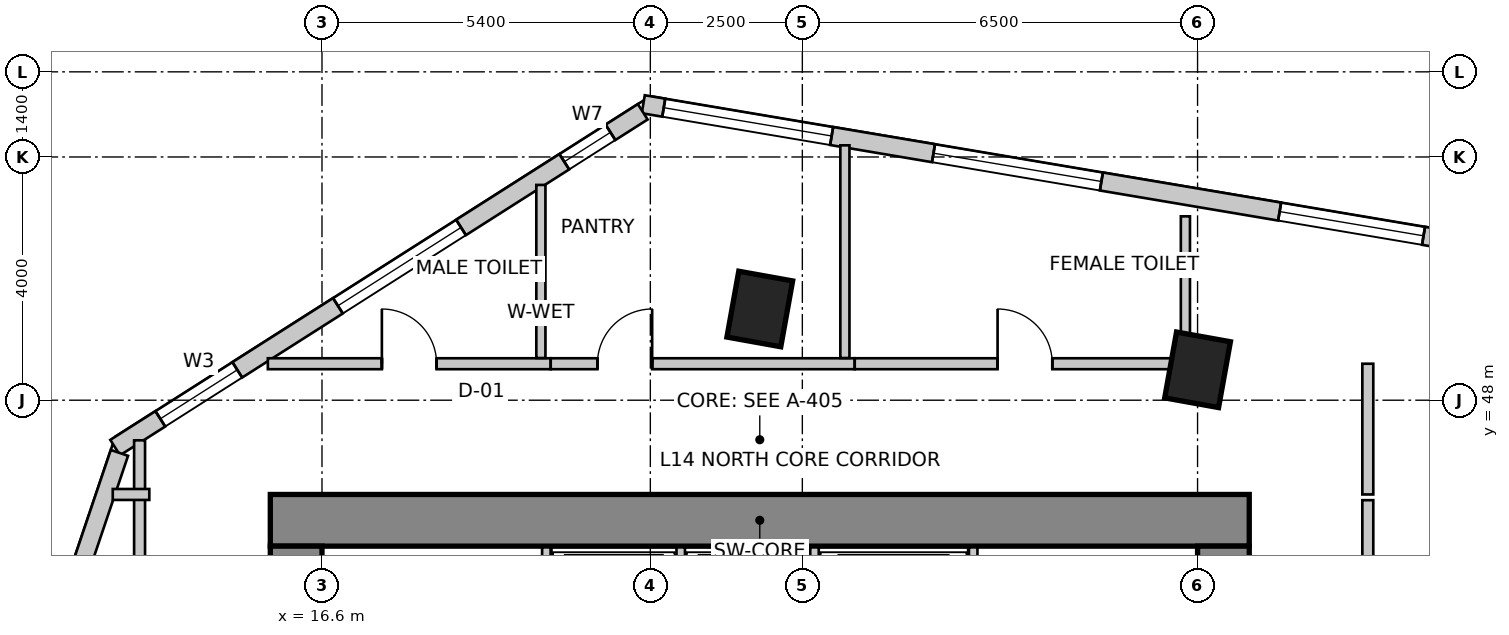
"""IFC4 building model, lengths in metres.
Left out: names, types, materials, properties, quantities, classifications, styles, units other than length and angle.
Written with IfcOpenShell. Run it as: python <this file> out.ifc"""

import sys

from ifc_helpers import new_model, si_unit, direction, frame, frame_2d, origin, origin_2d, place, context, subcontext, project, spatial, rectangle, extrude, source, transform, mapped, element, fill, save


model = new_model("IFC4")
c1 = context("Model", 3, precision=1e-05, world=origin(), true_north=direction((0.0, 1.0)))
c2 = subcontext(c1, "Body", "Model", "MODEL_VIEW")
j1 = project(units=[si_unit("LENGTHUNIT", "METRE"), si_unit("PLANEANGLEUNIT", "RADIAN")], contexts=[c1])
p1 = place(None, origin())
s1 = spatial("IfcSite", under=j1, at=p1, CompositionType="ELEMENT")
p2 = place(p1, origin())
s2 = spatial("IfcBuilding", under=s1, at=p2, CompositionType="ELEMENT")
p3 = place(p2, frame((0.0, 0.0, 59.0)))
s3 = spatial("IfcBuildingStorey", under=s2, at=p3, CompositionType="ELEMENT", Elevation=59.0)
p4 = place(p3, frame((15.75, 46.025, 0.0), z_axis=(0.0, 0.0, 1.0), x_axis=(1.0, 0.0, 0.0)))
e1 = element("IfcWall", 1, at=p4, inside=s3, PredefinedType="SHEAR", context=c2, shape_type="SweptSolid", body=[
    extrude(rectangle(XDim=16.1, YDim=0.85, at=frame_2d((8.05, 0.0))), origin(), (0.0, 0.0, 1.0), 4.0),
])
p5 = place(p3, frame((16.175, 34.2, 0.0), z_axis=(0.0, 0.0, 1.0), x_axis=(0.0, 1.0, 0.0)))
e2 = element("IfcWall", 2, at=p5, inside=s3, PredefinedType="SHEAR", context=c2, shape_type="SweptSolid", body=[
    extrude(rectangle(XDim=11.4, YDim=0.85, at=frame_2d((5.7, 0.0))), origin(), (0.0, 0.0, 1.0), 4.0),
])
m1 = source(origin(), c2, "Body", "SweptSolid", [
    extrude(rectangle(XDim=1.1, YDim=2.15, at=frame_2d((0.55, 1.075))), frame((0.0, 0.435, 0.0), z_axis=(0.0, -1.0, 0.0), x_axis=(1.0, 0.0, 0.0)), (0.0, 0.0, 1.0), 0.87),
])
p6 = place(p5, frame((7.15, 0.0, 0.0)))
e3 = element("IfcOpeningElement", 3, at=p6, cuts=e2, PredefinedType="OPENING", context=c2, shape_type="MappedRepresentation", body=[
    mapped(m1, transform((0.0, 0.0, 0.0), scale=1.0)),
])
p7 = place(p3, frame((31.425, 34.2, 0.0), z_axis=(0.0, 0.0, 1.0), x_axis=(0.0, 1.0, 0.0)))
e4 = element("IfcWall", 4, at=p7, inside=s3, PredefinedType="SHEAR", context=c2, shape_type="SweptSolid", body=[
    extrude(rectangle(XDim=11.4, YDim=0.85, at=frame_2d((5.7, 0.0))), origin(), (0.0, 0.0, 1.0), 4.0),
])
p8 = place(p7, frame((7.35, 0.0, 0.0)))
e5 = element("IfcOpeningElement", 5, at=p8, cuts=e4, PredefinedType="OPENING", context=c2, shape_type="MappedRepresentation", body=[
    mapped(m1, transform((0.0, 0.0, 0.0), scale=1.0)),
])
m2 = source(origin(), c2, "Body", "SweptSolid", [
    extrude(rectangle(XDim=0.9, YDim=1.1, at=origin_2d()), origin(), (0.0, 0.0, 1.0), 4.0),
])
for number, where, z_axis, x_axis in (
    (6, (23.8, 49.5, 0.0), (0.0, 0.0, 1.0), (0.984, -0.177, 0.0)),
    (7, (31.0, 48.5, 0.0), (0.0, 0.0, 1.0), (0.984, -0.177, 0.0)),
):
    element("IfcColumn", number, at=place(p3, frame(where, z_axis=z_axis, x_axis=x_axis)), inside=s3, PredefinedType="COLUMN", context=c2, shape_type="MappedRepresentation", body=[
        mapped(m2, transform((0.0, 0.0, 0.0), scale=1.0)),
    ])
p9 = place(p3, frame((58.761, 46.648, 0.0), z_axis=(0.0, 0.0, 1.0), x_axis=(-0.98607502735, 0.166301053624, 0.0)))
e8 = element("IfcWall", 8, at=p9, inside=s3, PredefinedType="SOLIDWALL", context=c2, shape_type="SweptSolid", body=[
    extrude(rectangle(XDim=37.397, YDim=0.3, at=frame_2d((18.699, 0.0))), origin(), (0.0, 0.0, 1.0), 3.7),
])
m3 = source(origin(), c2, "Body", "SweptSolid", [
    extrude(rectangle(XDim=2.4, YDim=2.2, at=frame_2d((1.2, 1.1))), frame((0.0, 0.16, 0.0), z_axis=(0.0, -1.0, 0.0), x_axis=(1.0, 0.0, 0.0)), (0.0, 0.0, 1.0), 0.32),
])
p10 = place(p9, frame((0.375, 0.0, 0.85)))
e9 = element("IfcOpeningElement", 9, at=p10, cuts=e8, PredefinedType="OPENING", context=c2, shape_type="MappedRepresentation", body=[
    mapped(m3, transform((0.0, 0.0, 0.0), scale=1.0)),
])
m4 = source(origin(), c2, "Body", "SweptSolid", [
    extrude(rectangle(XDim=2.8, YDim=2.4, at=frame_2d((1.4, 1.2))), frame((0.0, 0.16, 0.0), z_axis=(0.0, -1.0, 0.0), x_axis=(1.0, 0.0, 0.0)), (0.0, 0.0, 1.0), 0.32),
])
p11 = place(p9, frame((5.357, 0.0, 0.85)))
e10 = element("IfcOpeningElement", 10, at=p11, cuts=e8, PredefinedType="OPENING", context=c2, shape_type="MappedRepresentation", body=[
    mapped(m4, transform((0.0, 0.0, 0.0), scale=1.0)),
])
p12 = place(p9, frame((12.772, 0.0, 0.85)))
e11 = element("IfcOpeningElement", 11, at=p12, cuts=e8, PredefinedType="OPENING", context=c2, shape_type="MappedRepresentation", body=[
    mapped(m4, transform((0.0, 0.0, 0.0), scale=1.0)),
])
p13 = place(p9, frame((19.194, 0.0, 0.85)))
e12 = element("IfcOpeningElement", 12, at=p13, cuts=e8, PredefinedType="OPENING", context=c2, shape_type="MappedRepresentation", body=[
    mapped(m4, transform((0.0, 0.0, 0.0), scale=1.0)),
])
p14 = place(p9, frame((24.384, 0.0, 0.85)))
e13 = element("IfcOpeningElement", 13, at=p14, cuts=e8, PredefinedType="OPENING", context=c2, shape_type="MappedRepresentation", body=[
    mapped(m3, transform((0.0, 0.0, 0.0), scale=1.0)),
])
p15 = place(p9, frame((29.757, 0.0, 0.85)))
e14 = element("IfcOpeningElement", 14, at=p15, cuts=e8, PredefinedType="OPENING", context=c2, shape_type="MappedRepresentation", body=[
    mapped(m4, transform((0.0, 0.0, 0.0), scale=1.0)),
])
p16 = place(p9, frame((34.256, 0.0, 0.85)))
e15 = element("IfcOpeningElement", 15, at=p16, cuts=e8, PredefinedType="OPENING", context=c2, shape_type="MappedRepresentation", body=[
    mapped(m4, transform((0.0, 0.0, 0.0), scale=1.0)),
])
p17 = place(p3, frame((21.875, 52.743, 0.0), z_axis=(0.0, 0.0, 1.0), x_axis=(-0.843647802826, -0.536896996441, 0.0)))
e16 = element("IfcWall", 16, at=p17, inside=s3, PredefinedType="SOLIDWALL", context=c2, shape_type="SweptSolid", body=[
    extrude(rectangle(XDim=10.284, YDim=0.3, at=frame_2d((5.142, 0.0))), origin(), (0.0, 0.0, 1.0), 3.7),
])
m5 = source(origin(), c2, "Body", "SweptSolid", [
    extrude(rectangle(XDim=0.9, YDim=1.6, at=frame_2d((0.45, 0.8))), frame((0.0, 0.16, 0.0), z_axis=(0.0, -1.0, 0.0), x_axis=(1.0, 0.0, 0.0)), (0.0, 0.0, 1.0), 0.32),
])
p18 = place(p17, frame((0.629, 0.0, 0.85)))
e17 = element("IfcOpeningElement", 17, at=p18, cuts=e16, PredefinedType="OPENING", context=c2, shape_type="MappedRepresentation", body=[
    mapped(m5, transform((0.0, 0.0, 0.0), scale=1.0)),
])
p19 = place(p17, frame((3.542, 0.0, 0.85)))
e18 = element("IfcOpeningElement", 18, at=p19, cuts=e16, PredefinedType="OPENING", context=c2, shape_type="MappedRepresentation", body=[
    mapped(m3, transform((0.0, 0.0, 0.0), scale=1.0)),
])
m6 = source(origin(), c2, "Body", "SweptSolid", [
    extrude(rectangle(XDim=1.5, YDim=1.8, at=frame_2d((0.75, 0.9))), frame((0.0, 0.16, 0.0), z_axis=(0.0, -1.0, 0.0), x_axis=(1.0, 0.0, 0.0)), (0.0, 0.0, 1.0), 0.32),
])
p20 = place(p17, frame((7.904, 0.0, 0.85)))
e19 = element("IfcOpeningElement", 19, at=p20, cuts=e16, PredefinedType="OPENING", context=c2, shape_type="MappedRepresentation", body=[
    mapped(m6, transform((0.0, 0.0, 0.0), scale=1.0)),
])
p21 = place(p3, frame((13.269, 47.134, 0.0), z_axis=(0.0, 0.0, 1.0), x_axis=(-0.319920423265, -0.947444416722, 0.0)))
e20 = element("IfcWall", 20, at=p21, inside=s3, PredefinedType="SOLIDWALL", context=c2, shape_type="SweptSolid", body=[
    extrude(rectangle(XDim=16.135, YDim=0.3, at=frame_2d((8.067, 0.0))), origin(), (0.0, 0.0, 1.0), 3.7),
])
p22 = place(p21, frame((1.988, 0.0, 0.85)))
e21 = element("IfcOpeningElement", 21, at=p22, cuts=e20, PredefinedType="OPENING", context=c2, shape_type="MappedRepresentation", body=[
    mapped(m4, transform((0.0, 0.0, 0.0), scale=1.0)),
])
p23 = place(p21, frame((7.159, 0.0, 0.85)))
e22 = element("IfcOpeningElement", 22, at=p23, cuts=e20, PredefinedType="OPENING", context=c2, shape_type="MappedRepresentation", body=[
    mapped(m3, transform((0.0, 0.0, 0.0), scale=1.0)),
])
p24 = place(p21, frame((11.93, 0.0, 0.85)))
e23 = element("IfcOpeningElement", 23, at=p24, cuts=e20, PredefinedType="OPENING", context=c2, shape_type="MappedRepresentation", body=[
    mapped(m4, transform((0.0, 0.0, 0.0), scale=1.0)),
])
for number, where, z_axis, x_axis in (
    (24, (20.29, 43.28, 0.0), (0.0, 0.0, 1.0), (0.0, 1.0, 0.0)),
    (25, (27.31, 43.28, 0.0), (0.0, 0.0, 1.0), (0.0, 1.0, 0.0)),
):
    element("IfcWall", number, at=place(p3, frame(where, z_axis=z_axis, x_axis=x_axis)), inside=s3, PredefinedType="SOLIDWALL", context=c2, shape_type="SweptSolid", body=[
        extrude(rectangle(XDim=2.3, YDim=0.14, at=frame_2d((1.15, 0.0))), origin(), (0.0, 0.0, 1.0), 3.7),
    ])
for number, where, z_axis, x_axis in (
    (26, (22.5, 43.02, 0.0), (0.0, 0.0, 1.0), (0.0, 1.0, 0.0)),
    (27, (24.7, 43.02, 0.0), (0.0, 0.0, 1.0), (0.0, 1.0, 0.0)),
):
    element("IfcWall", number, at=place(p3, frame(where, z_axis=z_axis, x_axis=x_axis)), inside=s3, PredefinedType="SOLIDWALL", context=c2, shape_type="SweptSolid", body=[
        extrude(rectangle(XDim=2.56, YDim=0.14, at=frame_2d((1.28, 0.0))), origin(), (0.0, 0.0, 1.0), 3.7),
    ])
p25 = place(p3, frame((13.6, 33.444, 0.0), z_axis=(0.0, 0.0, 1.0), x_axis=(0.0, 1.0, 0.0)))
e28 = element("IfcWall", 28, at=p25, inside=s3, PredefinedType="PARTITIONING", context=c2, shape_type="SweptSolid", body=[
    extrude(rectangle(XDim=13.896, YDim=0.18, at=frame_2d((6.948, 0.0))), origin(), (0.0, 0.0, 1.0), 2.842),
])
m7 = source(origin(), c2, "Body", "SweptSolid", [
    extrude(rectangle(XDim=0.9, YDim=2.15, at=frame_2d((0.45, 1.075))), frame((0.0, 0.1, 0.0), z_axis=(0.0, -1.0, 0.0), x_axis=(1.0, 0.0, 0.0)), (0.0, 0.0, 1.0), 0.2),
])
p26 = place(p25, frame((4.144, 0.0, 0.0)))
e29 = element("IfcOpeningElement", 29, at=p26, cuts=e28, PredefinedType="OPENING", context=c2, shape_type="MappedRepresentation", body=[
    mapped(m7, transform((0.0, 0.0, 0.0), scale=1.0)),
])
p27 = place(p3, frame((13.76, 46.45, 0.0), z_axis=(0.0, 0.0, 1.0), x_axis=(-1.0, 0.0, 0.0)))
e30 = element("IfcWall", 30, at=p27, inside=s3, PredefinedType="PARTITIONING", context=c2, shape_type="SweptSolid", body=[
    extrude(rectangle(XDim=0.601, YDim=0.18, at=frame_2d((0.301, 0.0))), origin(), (0.0, 0.0, 1.0), 3.7),
])
p28 = place(p3, frame((15.71, 48.6, 0.0), z_axis=(0.0, 0.0, 1.0), x_axis=(1.0, 0.0, 0.0)))
e31 = element("IfcWall", 31, at=p28, inside=s3, PredefinedType="PARTITIONING", context=c2, shape_type="SweptSolid", body=[
    extrude(rectangle(XDim=4.65, YDim=0.18, at=frame_2d((2.325, 0.0))), origin(), (0.0, 0.0, 1.0), 3.7),
])
p29 = place(p28, frame((1.875, 0.0, 0.0)))
e32 = element("IfcOpeningElement", 32, at=p29, cuts=e31, PredefinedType="OPENING", context=c2, shape_type="MappedRepresentation", body=[
    mapped(m7, transform((0.0, 0.0, 0.0), scale=1.0)),
])
p30 = place(p3, frame((20.362, 48.6, 0.0), z_axis=(0.0, 0.0, 1.0), x_axis=(1.0, 0.0, 0.0)))
e33 = element("IfcWall", 33, at=p30, inside=s3, PredefinedType="PARTITIONING", context=c2, shape_type="SweptSolid", body=[
    extrude(rectangle(XDim=4.998, YDim=0.18, at=frame_2d((2.499, 0.0))), origin(), (0.0, 0.0, 1.0), 3.384),
])
p31 = place(p30, frame((0.768, 0.0, 0.0)))
e34 = element("IfcOpeningElement", 34, at=p31, cuts=e33, PredefinedType="OPENING", context=c2, shape_type="MappedRepresentation", body=[
    mapped(m7, transform((0.0, 0.0, 0.0), scale=1.0)),
])
p32 = place(p3, frame((25.362, 48.6, 0.0), z_axis=(0.0, 0.0, 1.0), x_axis=(1.0, 0.0, 0.0)))
e35 = element("IfcWall", 35, at=p32, inside=s3, PredefinedType="PARTITIONING", context=c2, shape_type="SweptSolid", body=[
    extrude(rectangle(XDim=5.598, YDim=0.18, at=frame_2d((2.799, 0.0))), origin(), (0.0, 0.0, 1.0), 2.842),
])
p33 = place(p32, frame((2.349, 0.0, 0.0)))
e36 = element("IfcOpeningElement", 36, at=p33, cuts=e35, PredefinedType="OPENING", context=c2, shape_type="MappedRepresentation", body=[
    mapped(m7, transform((0.0, 0.0, 0.0), scale=1.0)),
])
p34 = place(p3, frame((33.8, 48.6, 0.0), z_axis=(0.0, 0.0, 1.0), x_axis=(0.0, -1.0, 0.0)))
e37 = element("IfcWall", 37, at=p34, inside=s3, PredefinedType="PARTITIONING", context=c2, shape_type="SweptSolid", body=[
    extrude(rectangle(XDim=2.15, YDim=0.18, at=frame_2d((1.075, 0.0))), origin(), (0.0, 0.0, 1.0), 2.842),
])
p35 = place(p3, frame((33.8, 46.356, 0.0), z_axis=(0.0, 0.0, 1.0), x_axis=(0.0, -1.0, 0.0)))
e38 = element("IfcWall", 38, at=p35, inside=s3, PredefinedType="PARTITIONING", context=c2, shape_type="SweptSolid", body=[
    extrude(rectangle(XDim=8.516, YDim=0.18, at=frame_2d((4.258, 0.0))), origin(), (0.0, 0.0, 1.0), 3.272),
])
p36 = place(p3, frame((20.2, 51.54, 0.0), z_axis=(0.0, 0.0, 1.0), x_axis=(0.0, -1.0, 0.0)))
e39 = element("IfcWall", 39, at=p36, inside=s3, PredefinedType="PARTITIONING", context=c2, shape_type="SweptSolid", body=[
    extrude(rectangle(XDim=2.846, YDim=0.15, at=frame_2d((1.423, 0.0))), origin(), (0.0, 0.0, 1.0), 3.7),
])
p37 = place(p3, frame((25.2, 52.192, 0.0), z_axis=(0.0, 0.0, 1.0), x_axis=(0.0, -1.0, 0.0)))
e40 = element("IfcWall", 40, at=p37, inside=s3, PredefinedType="PARTITIONING", context=c2, shape_type="SweptSolid", body=[
    extrude(rectangle(XDim=3.498, YDim=0.15, at=frame_2d((1.749, 0.0))), origin(), (0.0, 0.0, 1.0), 2.842),
])
p38 = place(p3, frame((30.8, 51.024, 0.0), z_axis=(0.0, 0.0, 1.0), x_axis=(0.0, -1.0, 0.0)))
e41 = element("IfcWall", 41, at=p38, inside=s3, PredefinedType="PARTITIONING", context=c2, shape_type="SweptSolid", body=[
    extrude(rectangle(XDim=2.204, YDim=0.15, at=frame_2d((1.102, 0.0))), origin(), (0.0, 0.0, 1.0), 3.7),
])
m8 = source(origin(), c2, "Body", "SweptSolid", [
    extrude(rectangle(XDim=2.4, YDim=2.2, at=frame_2d((1.2, 1.1))), frame((0.0, -0.015, 0.0), z_axis=(0.0, -1.0, 0.0), x_axis=(1.0, 0.0, 0.0)), (0.0, 0.0, 1.0), 0.06),
])
p39 = place(p14, origin())
e42 = element("IfcWindow", 42, at=p39, inside=s3, PartitioningType="SINGLE_PANEL", PredefinedType="WINDOW", context=c2, shape_type="MappedRepresentation", body=[
    mapped(m8, transform((0.0, 0.0, 0.0), scale=1.0)),
])
fill(e13, e42)
m9 = source(origin(), c2, "Body", "SweptSolid", [
    extrude(rectangle(XDim=2.8, YDim=2.4, at=frame_2d((1.4, 1.2))), frame((0.0, -0.015, 0.0), z_axis=(0.0, -1.0, 0.0), x_axis=(1.0, 0.0, 0.0)), (0.0, 0.0, 1.0), 0.06),
])
p40 = place(p15, origin())
e43 = element("IfcWindow", 43, at=p40, inside=s3, PartitioningType="SINGLE_PANEL", PredefinedType="WINDOW", context=c2, shape_type="MappedRepresentation", body=[
    mapped(m9, transform((0.0, 0.0, 0.0), scale=1.0)),
])
fill(e14, e43)
p41 = place(p16, origin())
e44 = element("IfcWindow", 44, at=p41, inside=s3, PartitioningType="SINGLE_PANEL", PredefinedType="WINDOW", context=c2, shape_type="MappedRepresentation", body=[
    mapped(m9, transform((0.0, 0.0, 0.0), scale=1.0)),
])
fill(e15, e44)
m10 = source(origin(), c2, "Body", "SweptSolid", [
    extrude(rectangle(XDim=0.9, YDim=1.6, at=frame_2d((0.45, 0.8))), frame((0.0, -0.015, 0.0), z_axis=(0.0, -1.0, 0.0), x_axis=(1.0, 0.0, 0.0)), (0.0, 0.0, 1.0), 0.06),
])
p42 = place(p18, origin())
e45 = element("IfcWindow", 45, at=p42, inside=s3, PartitioningType="SINGLE_PANEL", PredefinedType="WINDOW", context=c2, shape_type="MappedRepresentation", body=[
    mapped(m10, transform((0.0, 0.0, 0.0), scale=1.0)),
])
fill(e17, e45)
p43 = place(p19, origin())
e46 = element("IfcWindow", 46, at=p43, inside=s3, PartitioningType="SINGLE_PANEL", PredefinedType="WINDOW", context=c2, shape_type="MappedRepresentation", body=[
    mapped(m8, transform((0.0, 0.0, 0.0), scale=1.0)),
])
fill(e18, e46)
m11 = source(origin(), c2, "Body", "SweptSolid", [
    extrude(rectangle(XDim=1.5, YDim=1.8, at=frame_2d((0.75, 0.9))), frame((0.0, -0.015, 0.0), z_axis=(0.0, -1.0, 0.0), x_axis=(1.0, 0.0, 0.0)), (0.0, 0.0, 1.0), 0.06),
])
p44 = place(p20, origin())
e47 = element("IfcWindow", 47, at=p44, inside=s3, PartitioningType="SINGLE_PANEL", PredefinedType="WINDOW", context=c2, shape_type="MappedRepresentation", body=[
    mapped(m11, transform((0.0, 0.0, 0.0), scale=1.0)),
])
fill(e19, e47)
m12 = source(origin(), c2, "Body", "SweptSolid", [
    extrude(rectangle(XDim=0.9, YDim=2.15, at=frame_2d((0.45, 1.075))), frame((0.0, 0.025, 0.0), z_axis=(0.0, -1.0, 0.0), x_axis=(1.0, 0.0, 0.0)), (0.0, 0.0, 1.0), 0.05),
])
p45 = place(p29, origin())
e48 = element("IfcDoor", 48, at=p45, inside=s3, OperationType="SINGLE_SWING_LEFT", PredefinedType="DOOR", context=c2, shape_type="MappedRepresentation", body=[
    mapped(m12, transform((0.0, 0.0, 0.0), scale=1.0)),
])
fill(e32, e48)
p46 = place(p31, origin())
e49 = element("IfcDoor", 49, at=p46, inside=s3, OperationType="SINGLE_SWING_RIGHT", PredefinedType="DOOR", context=c2, shape_type="MappedRepresentation", body=[
    mapped(m12, transform((0.0, 0.0, 0.0), scale=1.0)),
])
fill(e34, e49)
p47 = place(p33, origin())
e50 = element("IfcDoor", 50, at=p47, inside=s3, OperationType="SINGLE_SWING_LEFT", PredefinedType="DOOR", context=c2, shape_type="MappedRepresentation", body=[
    mapped(m12, transform((0.0, 0.0, 0.0), scale=1.0)),
])
fill(e36, e50)
save(model, sys.argv[1])
